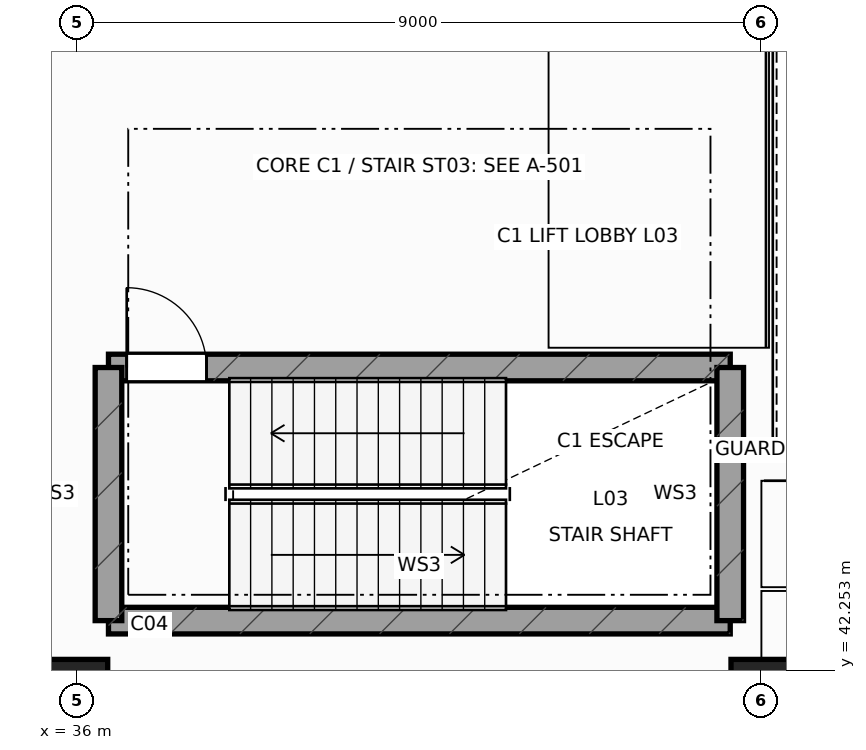
"""IFC4 building model, lengths in metres.
Left out: names, types, materials, properties, quantities, classifications, styles, units other than length and angle.
Written with IfcOpenShell. Run it as: python <this file> out.ifc"""

import sys

from ifc_helpers import new_model, si_unit, direction, frame, frame_2d, origin, origin_2d, place, context, subcontext, project, spatial, rectangle, extrude, element, fill, save


model = new_model("IFC4")
c1 = context("Model", 3, precision=1e-05, world=origin(), true_north=direction((0.0, 1.0)))
c2 = subcontext(c1, "Body", "Model", "MODEL_VIEW")
j1 = project(units=[si_unit("LENGTHUNIT", "METRE"), si_unit("PLANEANGLEUNIT", "RADIAN")], contexts=[c1])
p1 = place(None, origin())
s1 = spatial("IfcSite", under=j1, at=p1, CompositionType="ELEMENT")
p2 = place(p1, origin())
s2 = spatial("IfcBuilding", under=s1, at=p2, CompositionType="ELEMENT")
p3 = place(p2, frame((0.0, 0.0, 16.8)))
s3 = spatial("IfcBuildingStorey", under=s2, at=p3, CompositionType="ELEMENT", Elevation=16.8)
for number, where, z_axis, x_axis in (
    (1, (36.0, 42.0, 0.0), (0.0, 0.0, 1.0), (1.0, 0.0, 0.0)),
    (2, (45.0, 42.0, 0.0), (0.0, 0.0, 1.0), (1.0, 0.0, 0.0)),
):
    element("IfcColumn", number, at=place(p3, frame(where, z_axis=z_axis, x_axis=x_axis)), inside=s3, PredefinedType="COLUMN", context=c2, shape_type="SweptSolid", body=[
        extrude(rectangle(XDim=0.8, YDim=0.8, at=origin_2d()), origin(), (0.0, 0.0, 1.0), 4.8),
    ])
p4 = place(p3, frame((36.41, 42.91, 0.0), z_axis=(0.0, 0.0, 1.0), x_axis=(1.0, 0.0, 0.0)))
e3 = element("IfcWall", 3, at=p4, inside=s3, PredefinedType="SHEAR", context=c2, shape_type="SweptSolid", body=[
    extrude(rectangle(XDim=8.18, YDim=0.35, at=frame_2d((4.09, 0.0))), origin(), (0.0, 0.0, 1.0), 4.52),
])
p5 = place(p3, frame((36.41, 46.24, 0.0), z_axis=(0.0, 0.0, 1.0), x_axis=(1.0, 0.0, 0.0)))
e4 = element("IfcWall", 4, at=p5, inside=s3, PredefinedType="SHEAR", context=c2, shape_type="SweptSolid", body=[
    extrude(rectangle(XDim=8.18, YDim=0.35, at=frame_2d((4.09, 0.0))), origin(), (0.0, 0.0, 1.0), 4.52),
])
p6 = place(p5, frame((0.24, 0.0, 0.0)))
e5 = element("IfcOpeningElement", 5, at=p6, cuts=e4, PredefinedType="OPENING", context=c2, shape_type="SweptSolid", body=[
    extrude(rectangle(XDim=1.05, YDim=2.18, at=frame_2d((0.525, 1.09))), frame((0.0, 0.185, 0.0), z_axis=(0.0, -1.0, 0.0), x_axis=(1.0, 0.0, 0.0)), (0.0, 0.0, 1.0), 0.37),
])
for number, where, z_axis, x_axis in (
    (6, (36.41, 42.91, 0.0), (0.0, 0.0, 1.0), (0.0, 1.0, 0.0)),
    (7, (44.59, 42.91, 0.0), (0.0, 0.0, 1.0), (0.0, 1.0, 0.0)),
):
    element("IfcWall", number, at=place(p3, frame(where, z_axis=z_axis, x_axis=x_axis)), inside=s3, PredefinedType="SHEAR", context=c2, shape_type="SweptSolid", body=[
        extrude(rectangle(XDim=3.33, YDim=0.35, at=frame_2d((1.665, 0.0))), origin(), (0.0, 0.0, 1.0), 4.52),
    ])
p7 = place(p6, origin())
e8 = element("IfcDoor", 8, at=p7, inside=s3, OperationType="SINGLE_SWING_LEFT", PredefinedType="DOOR", context=c2, shape_type="SweptSolid", body=[
    extrude(rectangle(XDim=1.05, YDim=2.18, at=frame_2d((0.525, 1.09))), frame((0.0, 0.025, 0.0), z_axis=(0.0, -1.0, 0.0), x_axis=(1.0, 0.0, 0.0)), (0.0, 0.0, 1.0), 0.05),
])
fill(e5, e8)
save(model, sys.argv[1])
